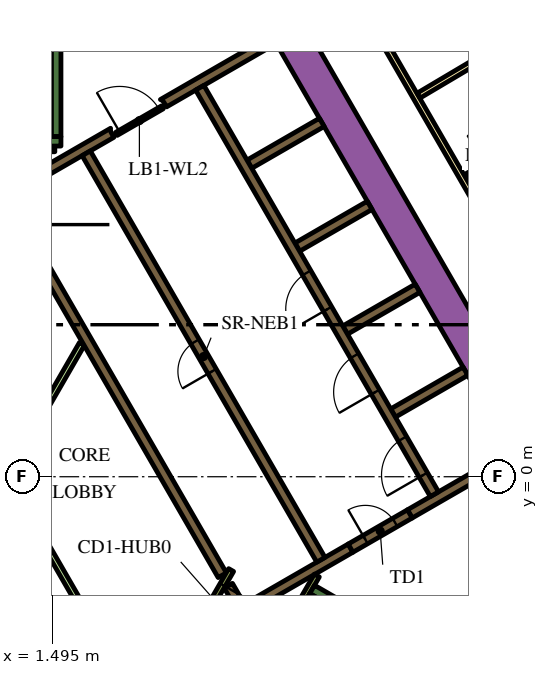
"""IFC4 building model, lengths in metres.
Left out: names, types, materials, properties, quantities, classifications, styles, units other than length and angle.
Written with IfcOpenShell. Run it as: python <this file> out.ifc"""

import sys

from ifc_helpers import new_model, si_unit, direction, frame, frame_2d, origin, place, context, subcontext, project, spatial, polyline, rectangle, outline, extrude, element, fill, save


model = new_model("IFC4")
c1 = context("Model", 3, precision=1e-05, world=origin(), true_north=direction((0.0, 1.0)))
c2 = subcontext(c1, "Body", "Model", "MODEL_VIEW")
j1 = project(units=[si_unit("LENGTHUNIT", "METRE"), si_unit("PLANEANGLEUNIT", "RADIAN")], contexts=[c1])
p1 = place(None, origin())
s1 = spatial("IfcSite", under=j1, at=p1, CompositionType="ELEMENT")
p2 = place(p1, origin())
s2 = spatial("IfcBuilding", under=s1, at=p2, CompositionType="ELEMENT")
p3 = place(p2, frame((0.0, 0.0, 118.8)))
s3 = spatial("IfcBuildingStorey", under=s2, at=p3, CompositionType="ELEMENT", Elevation=118.8)
p4 = place(p3, frame((6.776, 13.364, 0.0), z_axis=(0.0, 0.0, 1.0), x_axis=(0.500004177138, -0.8660229921, 0.0)))
e1 = element("IfcWall", 1, at=p4, inside=s3, PredefinedType="SOLIDWALL", context=c2, shape_type="SweptSolid", body=[
    extrude(rectangle(XDim=20.204, YDim=0.9, at=frame_2d((10.102, 0.0))), origin(), (0.0, 0.0, 1.0), 3.9),
])
p5 = place(p3, frame((8.334, -2.964, 0.0), z_axis=(0.0, 0.0, 1.0), x_axis=(0.866016039709, -0.500016218704, 0.0)))
e2 = element("IfcWall", 2, at=p5, inside=s3, PredefinedType="SOLIDWALL", context=c2, shape_type="SweptSolid", body=[
    extrude(rectangle(XDim=7.05, YDim=0.25, at=frame_2d((3.525, 0.0))), origin(), (0.0, 0.0, 1.0), 3.9),
])
p6 = place(p3, frame((8.168, -3.503, 0.0), z_axis=(0.0, 0.0, 1.0), x_axis=(0.49972245349, 0.866185586049, 0.0)))
e3 = element("IfcWall", 3, at=p6, inside=s3, PredefinedType="SOLIDWALL", context=c2, shape_type="SweptSolid", body=[
    extrude(rectangle(XDim=0.425, YDim=0.25, at=frame_2d((0.212, 0.0))), origin(), (0.0, 0.0, 1.0), 3.9),
])
p7 = place(p3, frame((1.6, 8.95, 0.0), z_axis=(0.0, 0.0, 1.0), x_axis=(0.0, 1.0, 0.0)))
e4 = element("IfcWall", 4, at=p7, inside=s3, PredefinedType="SOLIDWALL", context=c2, shape_type="SweptSolid", body=[
    extrude(rectangle(XDim=6.8, YDim=0.25, at=frame_2d((3.4, 0.0))), origin(), (0.0, 0.0, 1.0), 3.9),
])
p8 = place(p3, frame((1.05, 8.825, 0.0), z_axis=(0.0, 0.0, 1.0), x_axis=(1.0, 0.0, 0.0)))
e5 = element("IfcWall", 5, at=p8, inside=s3, PredefinedType="SOLIDWALL", context=c2, shape_type="SweptSolid", body=[
    extrude(rectangle(XDim=0.675, YDim=0.25, at=frame_2d((0.337, 0.0))), origin(), (0.0, 0.0, 1.0), 3.9),
])
p9 = place(p3, frame((10.464, 1.677, 0.0), z_axis=(0.0, 0.0, 1.0), x_axis=(0.86605622881, 0.499946605688, 0.0)))
e6 = element("IfcWall", 6, at=p9, inside=s3, PredefinedType="SOLIDWALL", context=c2, shape_type="SweptSolid", body=[
    extrude(rectangle(XDim=2.2, YDim=0.25, at=frame_2d((1.1, 0.0))), origin(), (0.0, 0.0, 1.0), 3.9),
])
p10 = place(p3, frame((13.629, 0.594, 0.0), z_axis=(0.0, 0.0, 1.0), x_axis=(-0.86602790099, -0.499995674689, 0.0)))
e7 = element("IfcWall", 7, at=p10, inside=s3, PredefinedType="SOLIDWALL", context=c2, shape_type="SweptSolid", body=[
    extrude(rectangle(XDim=3.146, YDim=0.25, at=frame_2d((1.573, 0.0))), origin(), (0.0, 0.0, 1.0), 3.9),
])
p11 = place(p3, frame((9.346, -1.879, 0.0), z_axis=(0.0, 0.0, 1.0), x_axis=(-0.866048528039, -0.499959945477, 0.0)))
e8 = element("IfcWall", 8, at=p11, inside=s3, PredefinedType="SOLIDWALL", context=c2, shape_type="SweptSolid", body=[
    extrude(rectangle(XDim=3.47, YDim=0.25, at=frame_2d((1.735, 0.0))), origin(), (0.0, 0.0, 1.0), 3.9),
])
p12 = place(p3, frame((6.13, -2.867, 0.0), z_axis=(0.0, 0.0, 1.0), x_axis=(0.500160776593, -0.865932559475, 0.0)))
e9 = element("IfcWall", 9, at=p12, inside=s3, PredefinedType="SOLIDWALL", context=c2, shape_type="SweptSolid", body=[
    extrude(rectangle(XDim=0.627, YDim=0.25, at=frame_2d((0.313, 0.0))), origin(), (0.0, 0.0, 1.0), 3.9),
])
for number, where, z_axis, x_axis in (
    (10, (9.204, 3.859, 0.0), (0.0, 0.0, 1.0), (0.866, 0.5, 0.0)),
    (11, (7.944, 6.041, 0.0), (0.0, 0.0, 1.0), (0.866, 0.5, 0.0)),
    (12, (6.684, 8.224, 0.0), (0.0, 0.0, 1.0), (0.866, 0.5, 0.0)),
):
    element("IfcWall", number, at=place(p3, frame(where, z_axis=z_axis, x_axis=x_axis)), inside=s3, PredefinedType="SOLIDWALL", context=c2, shape_type="SweptSolid", body=[
        extrude(rectangle(XDim=2.2, YDim=0.25, at=frame_2d((1.1, 0.0))), origin(), (0.0, 0.0, 1.0), 3.9),
    ])
p13 = place(p3, origin())
e13 = element("IfcWall", 13, at=p13, inside=s3, PredefinedType="SOLIDWALL", context=c2, shape_type="SweptSolid", body=[
    extrude(outline(polyline([(2.776, 8.733), (2.499, 8.573), (2.498, 8.573), (2.498, 8.573), (2.282, 8.448), (2.282, 8.448), (0.377, 7.348), (0.16, 7.223), (0.035, 7.439), (3.032, 9.169), (3.03, 9.152), (3.03, 9.133), (3.031, 9.113), (3.035, 9.094), (3.04, 9.075), (3.047, 9.057), (3.056, 9.039), (3.119, 8.931), (2.776, 8.733)])), origin(), (0.0, 0.0, 1.0), 3.9),
])
e14 = element("IfcWall", 14, at=p13, inside=s3, PredefinedType="SOLIDWALL", context=c2, shape_type="SweptSolid", body=[
    extrude(outline(polyline([(5.27, 10.173), (5.27, 10.173), (4.683, 9.834), (4.504, 9.731), (4.442, 9.839), (4.431, 9.856), (4.419, 9.871), (4.406, 9.885), (4.39, 9.898), (4.374, 9.909), (4.357, 9.918), (4.341, 9.925), (7.266, 11.614), (7.391, 11.398), (5.486, 10.298), (5.486, 10.298), (5.27, 10.173), (5.27, 10.173)])), origin(), (0.0, 0.0, 1.0), 3.9),
])
p14 = place(p3, frame((5.97, -2.591, 0.0), z_axis=(0.0, 0.0, 1.0), x_axis=(-0.499994469932, 0.866028596547, 0.0)))
e15 = element("IfcWall", 15, at=p14, inside=s3, PredefinedType="SOLIDWALL", context=c2, shape_type="SweptSolid", body=[
    extrude(rectangle(XDim=10.488, YDim=0.25, at=frame_2d((5.244, 0.0))), origin(), (0.0, 0.0, 1.0), 3.9),
])
p15 = place(p3, frame((8.459, -2.599, 0.0), z_axis=(0.0, 0.0, 1.0), x_axis=(-0.500041054325, -0.866001699761, 0.0)))
e16 = element("IfcWall", 16, at=p15, inside=s3, PredefinedType="PARTITIONING", context=c2, shape_type="SweptSolid", body=[
    extrude(rectangle(XDim=0.929, YDim=0.15, at=frame_2d((0.464, 0.0))), origin(), (0.0, 0.0, 1.0), 3.9),
])
p16 = place(p3, frame((2.435, -3.718, 0.0), z_axis=(0.0, 0.0, 1.0), x_axis=(-0.499985176046, 0.866033962229, 0.0)))
e17 = element("IfcWall", 17, at=p16, inside=s3, PredefinedType="PARTITIONING", context=c2, shape_type="SweptSolid", body=[
    extrude(rectangle(XDim=8.875, YDim=0.15, at=frame_2d((4.438, 0.0))), origin(), (0.0, 0.0, 1.0), 2.75),
])
p17 = place(p3, frame((0.336, 0.132, 0.0), z_axis=(0.0, 0.0, 1.0), x_axis=(0.500001957507, 0.866024273614, 0.0)))
e18 = element("IfcWall", 18, at=p17, inside=s3, PredefinedType="PARTITIONING", context=c2, shape_type="SweptSolid", body=[
    extrude(rectangle(XDim=3.881, YDim=0.15, at=frame_2d((1.941, 0.0))), origin(), (0.0, 0.0, 1.0), 2.75),
])
p18 = place(p3, frame((1.05, 8.625, 0.0), z_axis=(0.0, 0.0, 1.0), x_axis=(1.0, 0.0, 0.0)))
e19 = element("IfcWall", 19, at=p18, inside=s3, PredefinedType="PARTITIONING", context=c2, shape_type="SweptSolid", body=[
    extrude(rectangle(XDim=0.514, YDim=0.15, at=frame_2d((0.257, 0.0))), origin(), (0.0, 0.0, 1.0), 2.75),
])
p19 = place(p3, frame((11.553, -0.46, 0.0), z_axis=(0.0, 0.0, 1.0), x_axis=(-0.500006514828, 0.866021642414, 0.0)))
e20 = element("IfcWall", 20, at=p19, inside=s3, PredefinedType="SOLIDWALL", context=c2, shape_type="SweptSolid", body=[
    extrude(rectangle(XDim=12.35, YDim=0.25, at=frame_2d((6.175, 0.0))), origin(), (0.0, 0.0, 1.0), 3.9),
])
p20 = place(p19, frame((0.585, 0.0, 0.0)))
e21 = element("IfcOpeningElement", 21, at=p20, cuts=e20, PredefinedType="OPENING", context=c2, shape_type="SweptSolid", body=[
    extrude(rectangle(XDim=1.1, YDim=2.1, at=frame_2d((0.55, 1.05))), frame((0.0, 0.135, 0.0), z_axis=(0.0, -1.0, 0.0), x_axis=(1.0, 0.0, 0.0)), (0.0, 0.0, 1.0), 0.27),
])
p21 = place(p19, frame((3.105, 0.0, 0.0)))
e22 = element("IfcOpeningElement", 22, at=p21, cuts=e20, PredefinedType="OPENING", context=c2, shape_type="SweptSolid", body=[
    extrude(rectangle(XDim=1.1, YDim=2.1, at=frame_2d((0.55, 1.05))), frame((0.0, 0.135, 0.0), z_axis=(0.0, -1.0, 0.0), x_axis=(1.0, 0.0, 0.0)), (0.0, 0.0, 1.0), 0.27),
])
p22 = place(p19, frame((5.625, 0.0, 0.0)))
e23 = element("IfcOpeningElement", 23, at=p22, cuts=e20, PredefinedType="OPENING", context=c2, shape_type="SweptSolid", body=[
    extrude(rectangle(XDim=1.1, YDim=2.1, at=frame_2d((0.55, 1.05))), frame((0.0, 0.135, 0.0), z_axis=(0.0, -1.0, 0.0), x_axis=(1.0, 0.0, 0.0)), (0.0, 0.0, 1.0), 0.27),
])
p23 = place(p3, frame((8.565, -2.185, 0.0), z_axis=(0.0, 0.0, 1.0), x_axis=(-0.499997954832, 0.866026584559, 0.0)))
e24 = element("IfcWall", 24, at=p23, inside=s3, PredefinedType="SOLIDWALL", context=c2, shape_type="SweptSolid", body=[
    extrude(rectangle(XDim=12.35, YDim=0.25, at=frame_2d((6.175, 0.0))), origin(), (0.0, 0.0, 1.0), 3.9),
])
p24 = place(p23, frame((5.725, 0.0, 0.0)))
e25 = element("IfcOpeningElement", 25, at=p24, cuts=e24, PredefinedType="OPENING", context=c2, shape_type="SweptSolid", body=[
    extrude(rectangle(XDim=0.9, YDim=2.1, at=frame_2d((0.45, 1.05))), frame((0.0, 0.135, 0.0), z_axis=(0.0, -1.0, 0.0), x_axis=(1.0, 0.0, 0.0)), (0.0, 0.0, 1.0), 0.27),
])
p25 = place(p3, frame((9.346, -1.879, 0.0), z_axis=(0.0, 0.0, 1.0), x_axis=(0.866047807691, 0.499961193289, 0.0)))
e26 = element("IfcWall", 26, at=p25, inside=s3, PredefinedType="SOLIDWALL", context=c2, shape_type="SweptSolid", body=[
    extrude(rectangle(XDim=1.8, YDim=0.25, at=frame_2d((0.9, 0.0))), origin(), (0.0, 0.0, 1.0), 3.9),
])
p26 = place(p25, frame((0.45, 0.0, 0.0)))
e27 = element("IfcOpeningElement", 27, at=p26, cuts=e26, PredefinedType="OPENING", context=c2, shape_type="SweptSolid", body=[
    extrude(rectangle(XDim=0.9, YDim=2.1, at=frame_2d((0.45, 1.05))), frame((0.0, 0.135, 0.0), z_axis=(0.0, -1.0, 0.0), x_axis=(1.0, 0.0, 0.0)), (0.0, 0.0, 1.0), 0.27),
])
p27 = place(p3, frame((6.203, -2.456, 0.0), z_axis=(0.0, 0.0, 1.0), x_axis=(-0.500043961785, -0.866000020948, 0.0)))
e28 = element("IfcWall", 28, at=p27, inside=s3, PredefinedType="PARTITIONING", context=c2, shape_type="SweptSolid", body=[
    extrude(rectangle(XDim=1.95, YDim=0.15, at=frame_2d((0.975, 0.0))), origin(), (0.0, 0.0, 1.0), 3.9),
])
p28 = place(p27, frame((0.45, 0.0, 0.0)))
e29 = element("IfcOpeningElement", 29, at=p28, cuts=e28, PredefinedType="OPENING", context=c2, shape_type="SweptSolid", body=[
    extrude(rectangle(XDim=0.9, YDim=2.1, at=frame_2d((0.45, 1.05))), frame((0.0, 0.085, 0.0), z_axis=(0.0, -1.0, 0.0), x_axis=(1.0, 0.0, 0.0)), (0.0, 0.0, 1.0), 0.17),
])
p29 = place(p3, frame((3.183, 9.02, 0.0), z_axis=(0.0, 0.0, 1.0), x_axis=(0.866034573852, 0.49998411664, 0.0)))
e30 = element("IfcWall", 30, at=p29, inside=s3, PredefinedType="PARTITIONING", context=c2, shape_type="SweptSolid", body=[
    extrude(rectangle(XDim=1.4, YDim=0.09, at=frame_2d((0.7, 0.0))), origin(), (0.0, 0.0, 1.0), 2.75),
])
p30 = place(p29, frame((0.1, 0.0, 0.0)))
e31 = element("IfcOpeningElement", 31, at=p30, cuts=e30, PredefinedType="OPENING", context=c2, shape_type="SweptSolid", body=[
    extrude(rectangle(XDim=1.2, YDim=2.1, at=frame_2d((0.6, 1.05))), frame((0.0, 0.055, 0.0), z_axis=(0.0, -1.0, 0.0), x_axis=(1.0, 0.0, 0.0)), (0.0, 0.0, 1.0), 0.11),
])
p31 = place(p3, frame((6.163, 18.475, 0.0), z_axis=(0.0, 0.0, 1.0), x_axis=(0.500001317485, -0.866024643133, 0.0)))
e32 = element("IfcWall", 32, at=p31, inside=s3, PredefinedType="PARTITIONING", context=c2, shape_type="SweptSolid", body=[
    extrude(rectangle(XDim=25.767, YDim=0.15, at=frame_2d((12.883, 0.0))), origin(), (0.0, 0.0, 1.0), 2.75),
])
p32 = place(p31, frame((19.306, 0.0, 0.0)))
e33 = element("IfcOpeningElement", 33, at=p32, cuts=e32, PredefinedType="OPENING", context=c2, shape_type="SweptSolid", body=[
    extrude(rectangle(XDim=1.0, YDim=2.1, at=frame_2d((0.5, 1.05))), frame((0.0, 0.085, 0.0), z_axis=(0.0, -1.0, 0.0), x_axis=(1.0, 0.0, 0.0)), (0.0, 0.0, 1.0), 0.17),
])
p33 = place(p31, frame((17.999, 0.0, 0.0)))
e34 = element("IfcOpeningElement", 34, at=p33, cuts=e32, PredefinedType="OPENING", context=c2, shape_type="SweptSolid", body=[
    extrude(rectangle(XDim=1.0, YDim=2.1, at=frame_2d((0.5, 1.05))), frame((0.0, 0.085, 0.0), z_axis=(0.0, -1.0, 0.0), x_axis=(1.0, 0.0, 0.0)), (0.0, 0.0, 1.0), 0.17),
])
p34 = place(p31, frame((0.596, 0.0, 0.0)))
e35 = element("IfcOpeningElement", 35, at=p34, cuts=e32, PredefinedType="OPENING", context=c2, shape_type="SweptSolid", body=[
    extrude(rectangle(XDim=1.0, YDim=2.1, at=frame_2d((0.5, 1.05))), frame((0.0, 0.085, 0.0), z_axis=(0.0, -1.0, 0.0), x_axis=(1.0, 0.0, 0.0)), (0.0, 0.0, 1.0), 0.17),
])
p35 = place(p3, frame((17.379, 13.731, 0.0), z_axis=(0.0, 0.0, 1.0), x_axis=(-0.860132461691, -0.510070728768, 0.0)))
e36 = element("IfcWall", 36, at=p35, inside=s3, PredefinedType="PARTITIONING", context=c2, shape_type="SweptSolid", body=[
    extrude(rectangle(XDim=7.257, YDim=0.15, at=frame_2d((3.628, 0.0))), origin(), (0.0, 0.0, 1.0), 2.75),
])
p36 = place(p3, frame((12.355, 7.9, 0.0), z_axis=(0.0, 0.0, 1.0), x_axis=(0.866034573852, 0.49998411664, 0.0)))
e37 = element("IfcWall", 37, at=p36, inside=s3, PredefinedType="PARTITIONING", context=c2, shape_type="SweptSolid", body=[
    extrude(rectangle(XDim=2.8, YDim=0.1, at=frame_2d((1.4, 0.0))), origin(), (0.0, 0.0, 1.0), 2.75),
])
p37 = place(p36, frame((0.6, 0.0, 0.0)))
e38 = element("IfcOpeningElement", 38, at=p37, cuts=e37, PredefinedType="OPENING", context=c2, shape_type="SweptSolid", body=[
    extrude(rectangle(XDim=0.9, YDim=2.1, at=frame_2d((0.45, 1.05))), frame((0.0, 0.06, 0.0), z_axis=(0.0, -1.0, 0.0), x_axis=(1.0, 0.0, 0.0)), (0.0, 0.0, 1.0), 0.12),
])
p38 = place(p20, origin())
e39 = element("IfcDoor", 39, at=p38, inside=s3, OperationType="DOUBLE_DOOR_SLIDING", PredefinedType="DOOR", context=c2, shape_type="SweptSolid", body=[
    extrude(rectangle(XDim=1.1, YDim=2.1, at=frame_2d((0.55, 1.05))), frame((0.0, 0.025, 0.0), z_axis=(0.0, -1.0, 0.0), x_axis=(1.0, 0.0, 0.0)), (0.0, 0.0, 1.0), 0.05),
])
fill(e21, e39)
p39 = place(p21, origin())
e40 = element("IfcDoor", 40, at=p39, inside=s3, OperationType="DOUBLE_DOOR_SLIDING", PredefinedType="DOOR", context=c2, shape_type="SweptSolid", body=[
    extrude(rectangle(XDim=1.1, YDim=2.1, at=frame_2d((0.55, 1.05))), frame((0.0, 0.025, 0.0), z_axis=(0.0, -1.0, 0.0), x_axis=(1.0, 0.0, 0.0)), (0.0, 0.0, 1.0), 0.05),
])
fill(e22, e40)
p40 = place(p22, origin())
e41 = element("IfcDoor", 41, at=p40, inside=s3, OperationType="DOUBLE_DOOR_SLIDING", PredefinedType="DOOR", context=c2, shape_type="SweptSolid", body=[
    extrude(rectangle(XDim=1.1, YDim=2.1, at=frame_2d((0.55, 1.05))), frame((0.0, 0.025, 0.0), z_axis=(0.0, -1.0, 0.0), x_axis=(1.0, 0.0, 0.0)), (0.0, 0.0, 1.0), 0.05),
])
fill(e23, e41)
p41 = place(p24, origin())
e42 = element("IfcDoor", 42, at=p41, inside=s3, OperationType="SINGLE_SWING_LEFT", PredefinedType="DOOR", context=c2, shape_type="SweptSolid", body=[
    extrude(rectangle(XDim=0.9, YDim=2.1, at=frame_2d((0.45, 1.05))), frame((0.0, 0.025, 0.0), z_axis=(0.0, -1.0, 0.0), x_axis=(1.0, 0.0, 0.0)), (0.0, 0.0, 1.0), 0.05),
])
fill(e25, e42)
p42 = place(p26, origin())
e43 = element("IfcDoor", 43, at=p42, inside=s3, OperationType="SINGLE_SWING_LEFT", PredefinedType="DOOR", context=c2, shape_type="SweptSolid", body=[
    extrude(rectangle(XDim=0.9, YDim=2.1, at=frame_2d((0.45, 1.05))), frame((0.0, 0.025, 0.0), z_axis=(0.0, -1.0, 0.0), x_axis=(1.0, 0.0, 0.0)), (0.0, 0.0, 1.0), 0.05),
])
fill(e27, e43)
p43 = place(p28, origin())
e44 = element("IfcDoor", 44, at=p43, inside=s3, OperationType="SINGLE_SWING_LEFT", PredefinedType="DOOR", context=c2, shape_type="SweptSolid", body=[
    extrude(rectangle(XDim=0.9, YDim=2.1, at=frame_2d((0.45, 1.05))), frame((0.0, 0.025, 0.0), z_axis=(0.0, -1.0, 0.0), x_axis=(1.0, 0.0, 0.0)), (0.0, 0.0, 1.0), 0.05),
])
fill(e29, e44)
p44 = place(p30, origin())
e45 = element("IfcDoor", 45, at=p44, inside=s3, OperationType="SINGLE_SWING_LEFT", PredefinedType="DOOR", context=c2, shape_type="SweptSolid", body=[
    extrude(rectangle(XDim=1.2, YDim=2.1, at=frame_2d((0.6, 1.05))), frame((0.0, 0.025, 0.0), z_axis=(0.0, -1.0, 0.0), x_axis=(1.0, 0.0, 0.0)), (0.0, 0.0, 1.0), 0.05),
])
fill(e31, e45)
save(model, sys.argv[1])
